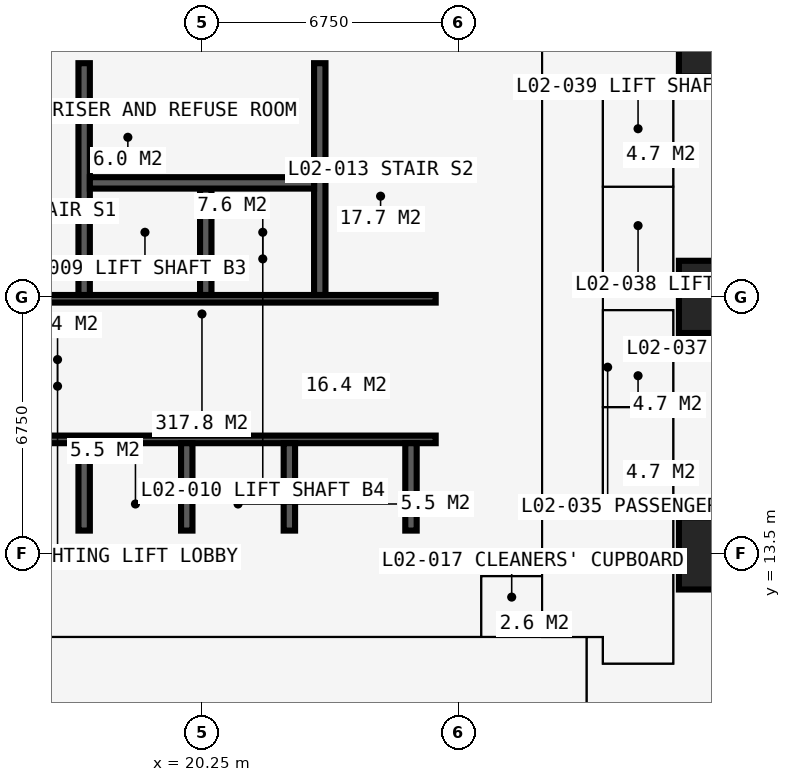
"""IFC4 building model, lengths in metres.
Left out: names, types, materials, properties, quantities, classifications, styles, units other than length and angle.
Written with IfcOpenShell. Run it as: python <this file> out.ifc"""

import sys

from ifc_helpers import new_model, si_unit, direction, frame, frame_2d, origin, origin_2d, place, context, subcontext, project, spatial, rectangle, extrude, element, fill, save


model = new_model("IFC4")
c1 = context("Model", 3, precision=1e-05, world=origin(), true_north=direction((0.0, 1.0)))
c2 = subcontext(c1, "Body", "Model", "MODEL_VIEW")
j1 = project(units=[si_unit("LENGTHUNIT", "METRE"), si_unit("PLANEANGLEUNIT", "RADIAN")], contexts=[c1])
p1 = place(None, origin())
s1 = spatial("IfcSite", under=j1, at=p1, CompositionType="ELEMENT")
p2 = place(p1, origin())
s2 = spatial("IfcBuilding", under=s1, at=p2, CompositionType="ELEMENT")
p3 = place(p2, frame((0.0, 0.0, 9.0)))
s3 = spatial("IfcBuildingStorey", under=s2, at=p3, CompositionType="ELEMENT", Elevation=9.0)
for number, where, z_axis, x_axis in (
    (1, (33.75, 13.5, 0.0), (0.0, 0.0, 1.0), (1.0, 0.0, 0.0)),
    (2, (33.75, 20.25, 0.0), (0.0, 0.0, 1.0), (1.0, 0.0, 0.0)),
    (3, (33.75, 27.0, 0.0), (0.0, 0.0, 1.0), (1.0, 0.0, 0.0)),
):
    element("IfcColumn", number, at=place(p3, frame(where, z_axis=z_axis, x_axis=x_axis)), inside=s3, PredefinedType="COLUMN", context=c2, shape_type="SweptSolid", body=[
        extrude(rectangle(XDim=1.9, YDim=1.9, at=origin_2d()), origin(), (0.0, 0.0, 1.0), 4.5),
    ])
p4 = place(p3, frame((12.9, 13.5, 0.0), z_axis=(0.0, 0.0, 1.0), x_axis=(1.0, 0.0, 0.0)))
e4 = element("IfcWall", 4, at=p4, inside=s3, PredefinedType="SHEAR", context=c2, shape_type="SweptSolid", body=[
    extrude(rectangle(XDim=14.7, YDim=1.2, at=frame_2d((7.35, 0.0))), origin(), (0.0, 0.0, 1.0), 4.5),
])
p5 = place(p3, frame((27.0, 14.1, 0.0), z_axis=(0.0, 0.0, 1.0), x_axis=(0.0, 1.0, 0.0)))
e5 = element("IfcWall", 5, at=p5, inside=s3, PredefinedType="SHEAR", context=c2, shape_type="SweptSolid", body=[
    extrude(rectangle(XDim=12.3, YDim=1.2, at=frame_2d((6.15, 0.0))), origin(), (0.0, 0.0, 1.0), 4.5),
])
p6 = place(p5, frame((3.65, 0.0, 0.0)))
e6 = element("IfcOpeningElement", 6, at=p6, cuts=e5, PredefinedType="OPENING", context=c2, shape_type="SweptSolid", body=[
    extrude(rectangle(XDim=1.2, YDim=2.2, at=frame_2d((0.6, 1.1))), frame((0.0, 0.61, 0.0), z_axis=(0.0, -1.0, 0.0), x_axis=(1.0, 0.0, 0.0)), (0.0, 0.0, 1.0), 1.22),
])
p7 = place(p3, frame((27.6, 27.0, 0.0), z_axis=(0.0, 0.0, 1.0), x_axis=(-1.0, 0.0, 0.0)))
e7 = element("IfcWall", 7, at=p7, inside=s3, PredefinedType="SHEAR", context=c2, shape_type="SweptSolid", body=[
    extrude(rectangle(XDim=14.7, YDim=1.2, at=frame_2d((7.35, 0.0))), origin(), (0.0, 0.0, 1.0), 4.5),
])
p8 = place(p7, frame((5.225, 0.0, 0.0)))
e8 = element("IfcOpeningElement", 8, at=p8, cuts=e7, PredefinedType="OPENING", context=c2, shape_type="SweptSolid", body=[
    extrude(rectangle(XDim=0.9, YDim=2.2, at=frame_2d((0.45, 1.1))), frame((0.0, 0.61, 0.0), z_axis=(0.0, -1.0, 0.0), x_axis=(1.0, 0.0, 0.0)), (0.0, 0.0, 1.0), 1.22),
])
p9 = place(p7, frame((8.2, 0.0, 0.0)))
e9 = element("IfcOpeningElement", 9, at=p9, cuts=e7, PredefinedType="OPENING", context=c2, shape_type="SweptSolid", body=[
    extrude(rectangle(XDim=1.0, YDim=2.2, at=frame_2d((0.5, 1.1))), frame((0.0, 0.61, 0.0), z_axis=(0.0, -1.0, 0.0), x_axis=(1.0, 0.0, 0.0)), (0.0, 0.0, 1.0), 1.22),
])
p10 = place(p3, frame((14.1, 16.5, 0.0), z_axis=(0.0, 0.0, 1.0), x_axis=(1.0, 0.0, 0.0)))
e10 = element("IfcWall", 10, at=p10, inside=s3, PredefinedType="SHEAR", context=c2, shape_type="SweptSolid", body=[
    extrude(rectangle(XDim=12.3, YDim=0.2, at=frame_2d((6.15, 0.0))), origin(), (0.0, 0.0, 1.0), 4.5),
])
p11 = place(p10, frame((0.9, 0.0, 0.0)))
e11 = element("IfcOpeningElement", 11, at=p11, cuts=e10, PredefinedType="OPENING", context=c2, shape_type="SweptSolid", body=[
    extrude(rectangle(XDim=1.1, YDim=2.2, at=frame_2d((0.55, 1.1))), frame((0.0, 0.11, 0.0), z_axis=(0.0, -1.0, 0.0), x_axis=(1.0, 0.0, 0.0)), (0.0, 0.0, 1.0), 0.22),
])
p12 = place(p10, frame((9.5, 0.0, 0.0)))
e12 = element("IfcOpeningElement", 12, at=p12, cuts=e10, PredefinedType="OPENING", context=c2, shape_type="SweptSolid", body=[
    extrude(rectangle(XDim=1.1, YDim=2.2, at=frame_2d((0.55, 1.1))), frame((0.0, 0.11, 0.0), z_axis=(0.0, -1.0, 0.0), x_axis=(1.0, 0.0, 0.0)), (0.0, 0.0, 1.0), 0.22),
])
p13 = place(p3, frame((14.1, 20.2, 0.0), z_axis=(0.0, 0.0, 1.0), x_axis=(1.0, 0.0, 0.0)))
e13 = element("IfcWall", 13, at=p13, inside=s3, PredefinedType="SHEAR", context=c2, shape_type="SweptSolid", body=[
    extrude(rectangle(XDim=12.3, YDim=0.2, at=frame_2d((6.15, 0.0))), origin(), (0.0, 0.0, 1.0), 4.5),
])
p14 = place(p13, frame((0.35, 0.0, 0.0)))
e14 = element("IfcOpeningElement", 14, at=p14, cuts=e13, PredefinedType="OPENING", context=c2, shape_type="SweptSolid", body=[
    extrude(rectangle(XDim=1.1, YDim=2.2, at=frame_2d((0.55, 1.1))), frame((0.0, 0.11, 0.0), z_axis=(0.0, -1.0, 0.0), x_axis=(1.0, 0.0, 0.0)), (0.0, 0.0, 1.0), 0.22),
])
p15 = place(p13, frame((9.75, 0.0, 0.0)))
e15 = element("IfcOpeningElement", 15, at=p15, cuts=e13, PredefinedType="OPENING", context=c2, shape_type="SweptSolid", body=[
    extrude(rectangle(XDim=1.1, YDim=2.2, at=frame_2d((0.55, 1.1))), frame((0.0, 0.11, 0.0), z_axis=(0.0, -1.0, 0.0), x_axis=(1.0, 0.0, 0.0)), (0.0, 0.0, 1.0), 0.22),
])
for number, where, z_axis, x_axis in (
    (16, (17.15, 20.3, 0.0), (0.0, 0.0, 1.0), (0.0, 1.0, 0.0)),
    (17, (23.35, 20.3, 0.0), (0.0, 0.0, 1.0), (0.0, 1.0, 0.0)),
):
    element("IfcWall", number, at=place(p3, frame(where, z_axis=z_axis, x_axis=x_axis)), inside=s3, PredefinedType="SHEAR", context=c2, shape_type="SweptSolid", body=[
        extrude(rectangle(XDim=6.1, YDim=0.3, at=frame_2d((3.05, 0.0))), origin(), (0.0, 0.0, 1.0), 4.5),
    ])
p16 = place(p3, frame((20.35, 20.3, 0.0), z_axis=(0.0, 0.0, 1.0), x_axis=(0.0, 1.0, 0.0)))
e18 = element("IfcWall", 18, at=p16, inside=s3, PredefinedType="SHEAR", context=c2, shape_type="SweptSolid", body=[
    extrude(rectangle(XDim=2.8, YDim=0.3, at=frame_2d((1.4, 0.0))), origin(), (0.0, 0.0, 1.0), 4.5),
])
p17 = place(p3, frame((17.3, 23.25, 0.0), z_axis=(0.0, 0.0, 1.0), x_axis=(1.0, 0.0, 0.0)))
e19 = element("IfcWall", 19, at=p17, inside=s3, PredefinedType="SHEAR", context=c2, shape_type="SweptSolid", body=[
    extrude(rectangle(XDim=5.9, YDim=0.3, at=frame_2d((2.95, 0.0))), origin(), (0.0, 0.0, 1.0), 4.5),
])
for number, where, z_axis, x_axis in (
    (20, (17.15, 14.1, 0.0), (0.0, 0.0, 1.0), (0.0, 1.0, 0.0)),
    (21, (19.85, 14.1, 0.0), (0.0, 0.0, 1.0), (0.0, 1.0, 0.0)),
    (22, (22.55, 14.1, 0.0), (0.0, 0.0, 1.0), (0.0, 1.0, 0.0)),
    (23, (25.75, 14.1, 0.0), (0.0, 0.0, 1.0), (0.0, 1.0, 0.0)),
):
    element("IfcWall", number, at=place(p3, frame(where, z_axis=z_axis, x_axis=x_axis)), inside=s3, PredefinedType="SHEAR", context=c2, shape_type="SweptSolid", body=[
        extrude(rectangle(XDim=2.3, YDim=0.3, at=frame_2d((1.15, 0.0))), origin(), (0.0, 0.0, 1.0), 4.5),
    ])
p18 = place(p3, frame((18.875, 16.6, 0.0), z_axis=(0.0, 0.0, 1.0), x_axis=(0.0, 1.0, 0.0)))
e24 = element("IfcWall", 24, at=p18, inside=s3, PredefinedType="PARTITIONING", context=c2, shape_type="SweptSolid", body=[
    extrude(rectangle(XDim=3.5, YDim=0.15, at=frame_2d((1.75, 0.0))), origin(), (0.0, 0.0, 1.0), 4.25),
])
p19 = place(p18, frame((1.15, 0.0, 0.0)))
e25 = element("IfcOpeningElement", 25, at=p19, cuts=e24, PredefinedType="OPENING", context=c2, shape_type="SweptSolid", body=[
    extrude(rectangle(XDim=1.2, YDim=2.2, at=frame_2d((0.6, 1.1))), frame((0.0, 0.085, 0.0), z_axis=(0.0, -1.0, 0.0), x_axis=(1.0, 0.0, 0.0)), (0.0, 0.0, 1.0), 0.17),
])
p20 = place(p3, frame((21.625, 16.6, 0.0), z_axis=(0.0, 0.0, 1.0), x_axis=(0.0, 1.0, 0.0)))
e26 = element("IfcWall", 26, at=p20, inside=s3, PredefinedType="PARTITIONING", context=c2, shape_type="SweptSolid", body=[
    extrude(rectangle(XDim=3.5, YDim=0.15, at=frame_2d((1.75, 0.0))), origin(), (0.0, 0.0, 1.0), 4.25),
])
p21 = place(p20, frame((1.15, 0.0, 0.0)))
e27 = element("IfcOpeningElement", 27, at=p21, cuts=e26, PredefinedType="OPENING", context=c2, shape_type="SweptSolid", body=[
    extrude(rectangle(XDim=1.2, YDim=2.2, at=frame_2d((0.6, 1.1))), frame((0.0, 0.085, 0.0), z_axis=(0.0, -1.0, 0.0), x_axis=(1.0, 0.0, 0.0)), (0.0, 0.0, 1.0), 0.17),
])
p22 = place(p3, frame((20.38, 16.6, 0.0), z_axis=(0.0, 0.0, 1.0), x_axis=(0.0, 1.0, 0.0)))
e28 = element("IfcWall", 28, at=p22, inside=s3, PredefinedType="PARTITIONING", context=c2, shape_type="SweptSolid", body=[
    extrude(rectangle(XDim=3.5, YDim=0.15, at=frame_2d((1.75, 0.0))), origin(), (0.0, 0.0, 1.0), 4.25),
])
p23 = place(p3, frame((19.375, 23.4, 0.0), z_axis=(0.0, 0.0, 1.0), x_axis=(0.0, 1.0, 0.0)))
e29 = element("IfcWall", 29, at=p23, inside=s3, PredefinedType="PARTITIONING", context=c2, shape_type="SweptSolid", body=[
    extrude(rectangle(XDim=3.0, YDim=0.15, at=frame_2d((1.5, 0.0))), origin(), (0.0, 0.0, 1.0), 4.25),
])
p24 = place(p3, frame((10.125, 11.3, 0.0), z_axis=(0.0, 0.0, 1.0), x_axis=(1.0, 0.0, 0.0)))
e30 = element("IfcWall", 30, at=p24, inside=s3, PredefinedType="PARTITIONING", context=c2, shape_type="SweptSolid", body=[
    extrude(rectangle(XDim=20.675, YDim=0.15, at=frame_2d((10.337, 0.0))), origin(), (0.0, 0.0, 1.0), 4.25),
])
p25 = place(p24, frame((1.725, 0.0, 0.0)))
e31 = element("IfcOpeningElement", 31, at=p25, cuts=e30, PredefinedType="OPENING", context=c2, shape_type="SweptSolid", body=[
    extrude(rectangle(XDim=1.0, YDim=2.2, at=frame_2d((0.5, 1.1))), frame((0.0, 0.085, 0.0), z_axis=(0.0, -1.0, 0.0), x_axis=(1.0, 0.0, 0.0)), (0.0, 0.0, 1.0), 0.17),
])
p26 = place(p24, frame((3.825, 0.0, 0.0)))
e32 = element("IfcOpeningElement", 32, at=p26, cuts=e30, PredefinedType="OPENING", context=c2, shape_type="SweptSolid", body=[
    extrude(rectangle(XDim=1.0, YDim=2.2, at=frame_2d((0.5, 1.1))), frame((0.0, 0.085, 0.0), z_axis=(0.0, -1.0, 0.0), x_axis=(1.0, 0.0, 0.0)), (0.0, 0.0, 1.0), 0.17),
])
p27 = place(p24, frame((10.675, 0.0, 0.0)))
e33 = element("IfcOpeningElement", 33, at=p27, cuts=e30, PredefinedType="OPENING", context=c2, shape_type="SweptSolid", body=[
    extrude(rectangle(XDim=1.5, YDim=2.2, at=frame_2d((0.75, 1.1))), frame((0.0, 0.085, 0.0), z_axis=(0.0, -1.0, 0.0), x_axis=(1.0, 0.0, 0.0)), (0.0, 0.0, 1.0), 0.17),
])
p28 = place(p3, frame((27.6, 11.3, 0.0), z_axis=(0.0, 0.0, 1.0), x_axis=(0.0, 1.0, 0.0)))
e34 = element("IfcWall", 34, at=p28, inside=s3, PredefinedType="PARTITIONING", context=c2, shape_type="SweptSolid", body=[
    extrude(rectangle(XDim=1.6, YDim=0.15, at=frame_2d((0.8, 0.0))), origin(), (0.0, 0.0, 1.0), 4.25),
])
p29 = place(p28, frame((0.3, 0.0, 0.0)))
e35 = element("IfcOpeningElement", 35, at=p29, cuts=e34, PredefinedType="OPENING", context=c2, shape_type="SweptSolid", body=[
    extrude(rectangle(XDim=0.95, YDim=2.2, at=frame_2d((0.475, 1.1))), frame((0.0, 0.085, 0.0), z_axis=(0.0, -1.0, 0.0), x_axis=(1.0, 0.0, 0.0)), (0.0, 0.0, 1.0), 0.17),
])
p30 = place(p3, frame((27.6, 12.9, 0.0), z_axis=(0.0, 0.0, 1.0), x_axis=(1.0, 0.0, 0.0)))
e36 = element("IfcWall", 36, at=p30, inside=s3, PredefinedType="PARTITIONING", context=c2, shape_type="SweptSolid", body=[
    extrude(rectangle(XDim=1.6, YDim=0.15, at=frame_2d((0.8, 0.0))), origin(), (0.0, 0.0, 1.0), 3.752),
])
p31 = place(p3, frame((29.2, 11.3, 0.0), z_axis=(0.0, 0.0, 1.0), x_axis=(0.0, 1.0, 0.0)))
e37 = element("IfcWall", 37, at=p31, inside=s3, PredefinedType="PARTITIONING", context=c2, shape_type="SweptSolid", body=[
    extrude(rectangle(XDim=20.3, YDim=0.15, at=frame_2d((10.15, 0.0))), origin(), (0.0, 0.0, 1.0), 4.25),
])
p32 = place(p31, frame((15.35, 0.0, 0.0)))
e38 = element("IfcOpeningElement", 38, at=p32, cuts=e37, PredefinedType="OPENING", context=c2, shape_type="SweptSolid", body=[
    extrude(rectangle(XDim=1.6, YDim=2.4, at=frame_2d((0.8, 1.2))), frame((0.0, 0.085, 0.0), z_axis=(0.0, -1.0, 0.0), x_axis=(1.0, 0.0, 0.0)), (0.0, 0.0, 1.0), 0.17),
])
p33 = place(p31, frame((8.35, 0.0, 0.0)))
e39 = element("IfcOpeningElement", 39, at=p33, cuts=e37, PredefinedType="OPENING", context=c2, shape_type="SweptSolid", body=[
    extrude(rectangle(XDim=1.2, YDim=2.2, at=frame_2d((0.6, 1.1))), frame((0.0, 0.085, 0.0), z_axis=(0.0, -1.0, 0.0), x_axis=(1.0, 0.0, 0.0)), (0.0, 0.0, 1.0), 0.17),
])
p34 = place(p3, frame((29.2, 25.7, 0.0), z_axis=(0.0, 0.0, 1.0), x_axis=(1.0, 0.0, 0.0)))
e40 = element("IfcWall", 40, at=p34, inside=s3, PredefinedType="SHEAR", context=c2, shape_type="SweptSolid", body=[
    extrude(rectangle(XDim=3.45, YDim=0.1, at=frame_2d((1.725, 0.0))), origin(), (0.0, 0.0, 1.0), 4.25),
])
p35 = place(p3, frame((30.375, -0.75, 0.0), z_axis=(0.0, 0.0, 1.0), x_axis=(0.0, 1.0, 0.0)))
e41 = element("IfcWall", 41, at=p35, inside=s3, PredefinedType="PARTITIONING", context=c2, shape_type="SweptSolid", body=[
    extrude(rectangle(XDim=12.05, YDim=0.15, at=frame_2d((6.025, 0.0))), origin(), (0.0, 0.0, 1.0), 4.25),
])
p36 = place(p3, frame((30.8, 10.6, 0.0), z_axis=(0.0, 0.0, 1.0), x_axis=(0.0, 1.0, 0.0)))
e42 = element("IfcWall", 42, at=p36, inside=s3, PredefinedType="PARTITIONING", context=c2, shape_type="SweptSolid", body=[
    extrude(rectangle(XDim=0.7, YDim=0.15, at=frame_2d((0.35, 0.0))), origin(), (0.0, 0.0, 1.0), 4.25),
])
p37 = place(p3, frame((30.8, 10.6, 0.0), z_axis=(0.0, 0.0, 1.0), x_axis=(1.0, 0.0, 0.0)))
e43 = element("IfcWall", 43, at=p37, inside=s3, PredefinedType="PARTITIONING", context=c2, shape_type="SweptSolid", body=[
    extrude(rectangle(XDim=1.85, YDim=0.15, at=frame_2d((0.925, 0.0))), origin(), (0.0, 0.0, 1.0), 4.25),
])
p38 = place(p3, frame((30.8, 14.8, 0.0), z_axis=(0.0, 0.0, 1.0), x_axis=(0.0, 1.0, 0.0)))
e44 = element("IfcWall", 44, at=p38, inside=s3, PredefinedType="PARTITIONING", context=c2, shape_type="SweptSolid", body=[
    extrude(rectangle(XDim=10.9, YDim=0.15, at=frame_2d((5.45, 0.0))), origin(), (0.0, 0.0, 1.0), 4.25),
])
p39 = place(p38, frame((0.75, 0.0, 0.0)))
e45 = element("IfcOpeningElement", 45, at=p39, cuts=e44, PredefinedType="OPENING", context=c2, shape_type="SweptSolid", body=[
    extrude(rectangle(XDim=1.1, YDim=2.2, at=frame_2d((0.55, 1.1))), frame((0.0, 0.085, 0.0), z_axis=(0.0, -1.0, 0.0), x_axis=(1.0, 0.0, 0.0)), (0.0, 0.0, 1.0), 0.17),
])
p40 = place(p38, frame((3.25, 0.0, 0.0)))
e46 = element("IfcOpeningElement", 46, at=p40, cuts=e44, PredefinedType="OPENING", context=c2, shape_type="SweptSolid", body=[
    extrude(rectangle(XDim=1.1, YDim=2.2, at=frame_2d((0.55, 1.1))), frame((0.0, 0.085, 0.0), z_axis=(0.0, -1.0, 0.0), x_axis=(1.0, 0.0, 0.0)), (0.0, 0.0, 1.0), 0.17),
])
p41 = place(p38, frame((6.5, 0.0, 0.0)))
e47 = element("IfcOpeningElement", 47, at=p41, cuts=e44, PredefinedType="OPENING", context=c2, shape_type="SweptSolid", body=[
    extrude(rectangle(XDim=1.1, YDim=2.2, at=frame_2d((0.55, 1.1))), frame((0.0, 0.085, 0.0), z_axis=(0.0, -1.0, 0.0), x_axis=(1.0, 0.0, 0.0)), (0.0, 0.0, 1.0), 0.17),
])
p42 = place(p38, frame((9.05, 0.0, 0.0)))
e48 = element("IfcOpeningElement", 48, at=p42, cuts=e44, PredefinedType="OPENING", context=c2, shape_type="SweptSolid", body=[
    extrude(rectangle(XDim=1.1, YDim=2.2, at=frame_2d((0.55, 1.1))), frame((0.0, 0.085, 0.0), z_axis=(0.0, -1.0, 0.0), x_axis=(1.0, 0.0, 0.0)), (0.0, 0.0, 1.0), 0.17),
])
for number, where, z_axis, x_axis in (
    (49, (30.8, 14.8, 0.0), (0.0, 0.0, 1.0), (1.0, 0.0, 0.0)),
    (50, (30.8, 17.35, 0.0), (0.0, 0.0, 1.0), (1.0, 0.0, 0.0)),
    (51, (30.8, 19.9, 0.0), (0.0, 0.0, 1.0), (1.0, 0.0, 0.0)),
    (52, (30.8, 20.6, 0.0), (0.0, 0.0, 1.0), (1.0, 0.0, 0.0)),
    (53, (30.8, 23.15, 0.0), (0.0, 0.0, 1.0), (1.0, 0.0, 0.0)),
):
    element("IfcWall", number, at=place(p3, frame(where, z_axis=z_axis, x_axis=x_axis)), inside=s3, PredefinedType="SHEAR", context=c2, shape_type="SweptSolid", body=[
        extrude(rectangle(XDim=1.85, YDim=0.1, at=frame_2d((0.925, 0.0))), origin(), (0.0, 0.0, 1.0), 4.25),
    ])
p43 = place(p3, frame((32.65, 10.6, 0.0), z_axis=(0.0, 0.0, 1.0), x_axis=(0.0, 1.0, 0.0)))
e54 = element("IfcWall", 54, at=p43, inside=s3, PredefinedType="SHEAR", context=c2, shape_type="SweptSolid", body=[
    extrude(rectangle(XDim=9.3, YDim=0.1, at=frame_2d((4.65, 0.0))), origin(), (0.0, 0.0, 1.0), 4.25),
])
p44 = place(p3, frame((32.65, 20.6, 0.0), z_axis=(0.0, 0.0, 1.0), x_axis=(0.0, 1.0, 0.0)))
e55 = element("IfcWall", 55, at=p44, inside=s3, PredefinedType="PARTITIONING", context=c2, shape_type="SweptSolid", body=[
    extrude(rectangle(XDim=5.1, YDim=0.15, at=frame_2d((2.55, 0.0))), origin(), (0.0, 0.0, 1.0), 4.25),
])
p45 = place(p12, origin())
e56 = element("IfcDoor", 56, at=p45, inside=s3, OperationType="DOUBLE_DOOR_SLIDING", PredefinedType="DOOR", context=c2, shape_type="SweptSolid", body=[
    extrude(rectangle(XDim=1.1, YDim=2.2, at=frame_2d((0.55, 1.1))), frame((0.0, 0.025, 0.0), z_axis=(0.0, -1.0, 0.0), x_axis=(1.0, 0.0, 0.0)), (0.0, 0.0, 1.0), 0.05),
])
fill(e12, e56)
p46 = place(p6, origin())
e57 = element("IfcDoor", 57, at=p46, inside=s3, OperationType="DOUBLE_DOOR_SINGLE_SWING", PredefinedType="DOOR", context=c2, shape_type="SweptSolid", body=[
    extrude(rectangle(XDim=1.2, YDim=2.2, at=frame_2d((0.6, 1.1))), frame((0.0, 0.025, 0.0), z_axis=(0.0, -1.0, 0.0), x_axis=(1.0, 0.0, 0.0)), (0.0, 0.0, 1.0), 0.05),
])
fill(e6, e57)
p47 = place(p19, origin())
e58 = element("IfcDoor", 58, at=p47, inside=s3, OperationType="DOUBLE_DOOR_SINGLE_SWING", PredefinedType="DOOR", context=c2, shape_type="SweptSolid", body=[
    extrude(rectangle(XDim=1.2, YDim=2.2, at=frame_2d((0.6, 1.1))), frame((0.0, 0.025, 0.0), z_axis=(0.0, -1.0, 0.0), x_axis=(1.0, 0.0, 0.0)), (0.0, 0.0, 1.0), 0.05),
])
fill(e25, e58)
p48 = place(p21, origin())
e59 = element("IfcDoor", 59, at=p48, inside=s3, OperationType="DOUBLE_DOOR_SINGLE_SWING", PredefinedType="DOOR", context=c2, shape_type="SweptSolid", body=[
    extrude(rectangle(XDim=1.2, YDim=2.2, at=frame_2d((0.6, 1.1))), frame((0.0, 0.025, 0.0), z_axis=(0.0, -1.0, 0.0), x_axis=(1.0, 0.0, 0.0)), (0.0, 0.0, 1.0), 0.05),
])
fill(e27, e59)
p49 = place(p8, origin())
e60 = element("IfcDoor", 60, at=p49, inside=s3, OperationType="SINGLE_SWING_LEFT", PredefinedType="DOOR", context=c2, shape_type="SweptSolid", body=[
    extrude(rectangle(XDim=0.9, YDim=2.2, at=frame_2d((0.45, 1.1))), frame((0.0, 0.4, 0.0), z_axis=(0.0, -1.0, 0.0), x_axis=(1.0, 0.0, 0.0)), (0.0, 0.0, 1.0), 0.8),
])
fill(e8, e60)
p50 = place(p15, origin())
e61 = element("IfcDoor", 61, at=p50, inside=s3, OperationType="SINGLE_SWING_LEFT", PredefinedType="DOOR", context=c2, shape_type="SweptSolid", body=[
    extrude(rectangle(XDim=1.1, YDim=2.2, at=frame_2d((0.55, 1.1))), frame((0.0, 0.025, 0.0), z_axis=(0.0, -1.0, 0.0), x_axis=(1.0, 0.0, 0.0)), (0.0, 0.0, 1.0), 0.05),
])
fill(e15, e61)
p51 = place(p29, origin())
e62 = element("IfcDoor", 62, at=p51, inside=s3, OperationType="SINGLE_SWING_LEFT", PredefinedType="DOOR", context=c2, shape_type="SweptSolid", body=[
    extrude(rectangle(XDim=0.95, YDim=2.2, at=frame_2d((0.475, 1.1))), frame((0.0, 0.025, 0.0), z_axis=(0.0, -1.0, 0.0), x_axis=(1.0, 0.0, 0.0)), (0.0, 0.0, 1.0), 0.05),
])
fill(e35, e62)
p52 = place(p27, origin())
e63 = element("IfcDoor", 63, at=p52, inside=s3, OperationType="DOUBLE_DOOR_SINGLE_SWING", PredefinedType="DOOR", context=c2, shape_type="SweptSolid", body=[
    extrude(rectangle(XDim=1.5, YDim=2.2, at=frame_2d((0.75, 1.1))), frame((0.0, 0.025, 0.0), z_axis=(0.0, -1.0, 0.0), x_axis=(1.0, 0.0, 0.0)), (0.0, 0.0, 1.0), 0.05),
])
fill(e33, e63)
p53 = place(p32, origin())
e64 = element("IfcDoor", 64, at=p53, inside=s3, OperationType="DOUBLE_DOOR_SINGLE_SWING", PredefinedType="DOOR", context=c2, shape_type="SweptSolid", body=[
    extrude(rectangle(XDim=1.6, YDim=2.4, at=frame_2d((0.8, 1.2))), frame((0.0, 0.025, 0.0), z_axis=(0.0, -1.0, 0.0), x_axis=(1.0, 0.0, 0.0)), (0.0, 0.0, 1.0), 0.05),
])
fill(e38, e64)
p54 = place(p39, origin())
e65 = element("IfcDoor", 65, at=p54, inside=s3, OperationType="DOUBLE_DOOR_SLIDING", PredefinedType="DOOR", context=c2, shape_type="SweptSolid", body=[
    extrude(rectangle(XDim=1.1, YDim=2.2, at=frame_2d((0.55, 1.1))), frame((0.0, 0.025, 0.0), z_axis=(0.0, -1.0, 0.0), x_axis=(1.0, 0.0, 0.0)), (0.0, 0.0, 1.0), 0.05),
])
fill(e45, e65)
p55 = place(p40, origin())
e66 = element("IfcDoor", 66, at=p55, inside=s3, OperationType="DOUBLE_DOOR_SLIDING", PredefinedType="DOOR", context=c2, shape_type="SweptSolid", body=[
    extrude(rectangle(XDim=1.1, YDim=2.2, at=frame_2d((0.55, 1.1))), frame((0.0, 0.025, 0.0), z_axis=(0.0, -1.0, 0.0), x_axis=(1.0, 0.0, 0.0)), (0.0, 0.0, 1.0), 0.05),
])
fill(e46, e66)
p56 = place(p41, origin())
e67 = element("IfcDoor", 67, at=p56, inside=s3, OperationType="DOUBLE_DOOR_SLIDING", PredefinedType="DOOR", context=c2, shape_type="SweptSolid", body=[
    extrude(rectangle(XDim=1.1, YDim=2.2, at=frame_2d((0.55, 1.1))), frame((0.0, 0.025, 0.0), z_axis=(0.0, -1.0, 0.0), x_axis=(1.0, 0.0, 0.0)), (0.0, 0.0, 1.0), 0.05),
])
fill(e47, e67)
p57 = place(p42, origin())
e68 = element("IfcDoor", 68, at=p57, inside=s3, OperationType="DOUBLE_DOOR_SLIDING", PredefinedType="DOOR", context=c2, shape_type="SweptSolid", body=[
    extrude(rectangle(XDim=1.1, YDim=2.2, at=frame_2d((0.55, 1.1))), frame((0.0, 0.025, 0.0), z_axis=(0.0, -1.0, 0.0), x_axis=(1.0, 0.0, 0.0)), (0.0, 0.0, 1.0), 0.05),
])
fill(e48, e68)
p58 = place(p33, origin())
e69 = element("IfcDoor", 69, at=p58, inside=s3, OperationType="DOUBLE_DOOR_SINGLE_SWING", PredefinedType="DOOR", context=c2, shape_type="SweptSolid", body=[
    extrude(rectangle(XDim=1.2, YDim=2.2, at=frame_2d((0.6, 1.1))), frame((0.0, 0.025, 0.0), z_axis=(0.0, -1.0, 0.0), x_axis=(1.0, 0.0, 0.0)), (0.0, 0.0, 1.0), 0.05),
])
fill(e39, e69)
save(model, sys.argv[1])
